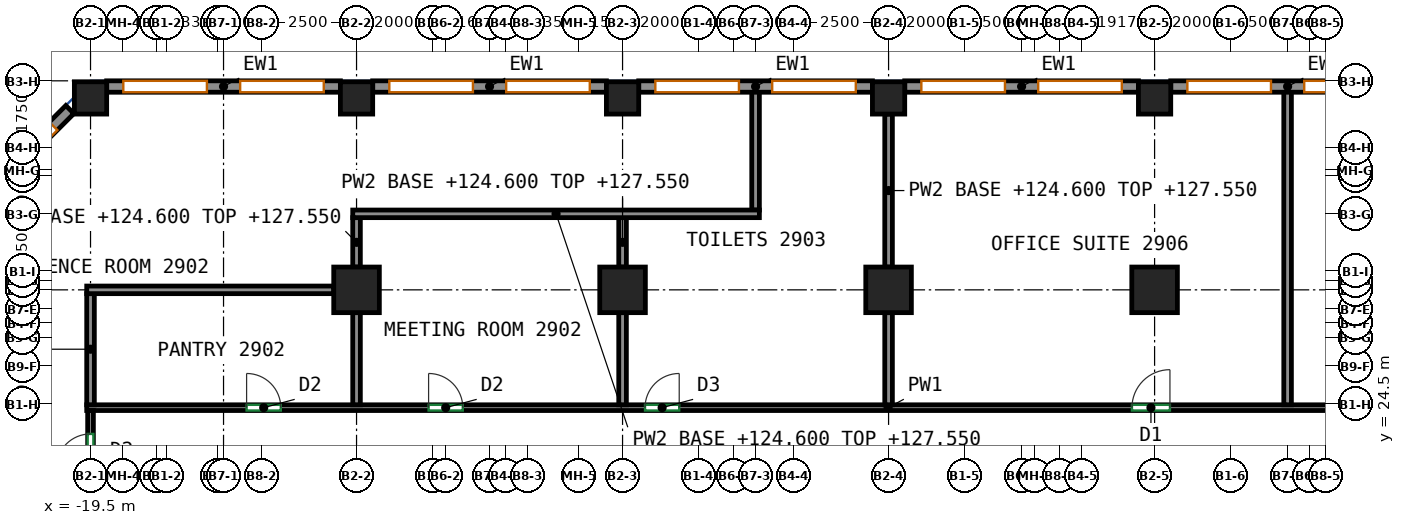
"""IFC4 building model, lengths in metres.
Left out: names, types, materials, properties, quantities, classifications, styles, units other than length and angle.
Written with IfcOpenShell. Run it as: python <this file> out.ifc"""

import sys

from ifc_helpers import new_model, si_unit, direction, frame, frame_2d, origin, origin_2d, place, context, subcontext, project, spatial, rectangle, extrude, source, transform, mapped, element, fill, save


model = new_model("IFC4")
c1 = context("Model", 3, precision=1e-05, world=origin(), true_north=direction((0.0, 1.0)))
c2 = subcontext(c1, "Body", "Model", "MODEL_VIEW")
j1 = project(units=[si_unit("LENGTHUNIT", "METRE"), si_unit("PLANEANGLEUNIT", "RADIAN")], contexts=[c1])
p1 = place(None, origin())
s1 = spatial("IfcSite", under=j1, at=p1, CompositionType="ELEMENT")
p2 = place(p1, origin())
s2 = spatial("IfcBuilding", under=s1, at=p2, CompositionType="ELEMENT")
p3 = place(p2, frame((0.0, 0.0, 124.6)))
s3 = spatial("IfcBuildingStorey", under=s2, at=p3, CompositionType="ELEMENT", Elevation=124.6)
m1 = source(origin(), c2, "Body", "SweptSolid", [
    extrude(rectangle(XDim=0.85, YDim=0.85, at=origin_2d()), origin(), (0.0, 0.0, 1.0), 3.6),
])
p4 = place(p3, frame((-19.5, 32.55, 0.0), z_axis=(0.0, 0.0, 1.0), x_axis=(1.0, 0.0, 0.0)))
e1 = element("IfcColumn", 1, at=p4, inside=s3, PredefinedType="COLUMN", context=c2, shape_type="MappedRepresentation", body=[
    mapped(m1, transform((0.0, 0.0, 0.0))),
])
m2 = source(origin(), c2, "Body", "SweptSolid", [
    extrude(rectangle(XDim=1.2, YDim=1.2, at=origin_2d()), origin(), (0.0, 0.0, 1.0), 3.6),
])
p5 = place(p3, frame((-12.5, 27.5, 0.0), z_axis=(0.0, 0.0, 1.0), x_axis=(1.0, 0.0, 0.0)))
e2 = element("IfcColumn", 2, at=p5, inside=s3, PredefinedType="COLUMN", context=c2, shape_type="MappedRepresentation", body=[
    mapped(m2, transform((0.0, 0.0, 0.0))),
])
p6 = place(p3, frame((-12.5, 32.55, 0.0), z_axis=(0.0, 0.0, 1.0), x_axis=(1.0, 0.0, 0.0)))
e3 = element("IfcColumn", 3, at=p6, inside=s3, PredefinedType="COLUMN", context=c2, shape_type="MappedRepresentation", body=[
    mapped(m1, transform((0.0, 0.0, 0.0))),
])
p7 = place(p3, frame((-5.5, 27.5, 0.0), z_axis=(0.0, 0.0, 1.0), x_axis=(1.0, 0.0, 0.0)))
e4 = element("IfcColumn", 4, at=p7, inside=s3, PredefinedType="COLUMN", context=c2, shape_type="MappedRepresentation", body=[
    mapped(m2, transform((0.0, 0.0, 0.0))),
])
p8 = place(p3, frame((-5.5, 32.55, 0.0), z_axis=(0.0, 0.0, 1.0), x_axis=(1.0, 0.0, 0.0)))
e5 = element("IfcColumn", 5, at=p8, inside=s3, PredefinedType="COLUMN", context=c2, shape_type="MappedRepresentation", body=[
    mapped(m1, transform((0.0, 0.0, 0.0))),
])
p9 = place(p3, frame((1.5, 27.5, 0.0), z_axis=(0.0, 0.0, 1.0), x_axis=(1.0, 0.0, 0.0)))
e6 = element("IfcColumn", 6, at=p9, inside=s3, PredefinedType="COLUMN", context=c2, shape_type="MappedRepresentation", body=[
    mapped(m2, transform((0.0, 0.0, 0.0))),
])
p10 = place(p3, frame((1.5, 32.55, 0.0), z_axis=(0.0, 0.0, 1.0), x_axis=(1.0, 0.0, 0.0)))
e7 = element("IfcColumn", 7, at=p10, inside=s3, PredefinedType="COLUMN", context=c2, shape_type="MappedRepresentation", body=[
    mapped(m1, transform((0.0, 0.0, 0.0))),
])
p11 = place(p3, frame((8.5, 27.5, 0.0), z_axis=(0.0, 0.0, 1.0), x_axis=(1.0, 0.0, 0.0)))
e8 = element("IfcColumn", 8, at=p11, inside=s3, PredefinedType="COLUMN", context=c2, shape_type="MappedRepresentation", body=[
    mapped(m2, transform((0.0, 0.0, 0.0))),
])
p12 = place(p3, frame((8.5, 32.55, 0.0), z_axis=(0.0, 0.0, 1.0), x_axis=(1.0, 0.0, 0.0)))
e9 = element("IfcColumn", 9, at=p12, inside=s3, PredefinedType="COLUMN", context=c2, shape_type="MappedRepresentation", body=[
    mapped(m1, transform((0.0, 0.0, 0.0))),
])
m3 = source(origin(), c2, "Body", "SweptSolid", [
    extrude(rectangle(XDim=6.15, YDim=0.3, at=frame_2d((3.075, 0.0))), origin(), (0.0, 0.0, 1.0), 3.6),
])
p13 = place(p3, frame((15.075, 32.85, 0.0), z_axis=(0.0, 0.0, 1.0), x_axis=(-1.0, 0.0, 0.0)))
e10 = element("IfcWall", 10, at=p13, inside=s3, PredefinedType="SOLIDWALL", context=c2, shape_type="MappedRepresentation", body=[
    mapped(m3, transform((0.0, 0.0, 0.0))),
])
p14 = place(p13, frame((0.438, 0.0, 0.7)))
e11 = element("IfcOpeningElement", 11, at=p14, cuts=e10, PredefinedType="OPENING", context=c2, shape_type="SweptSolid", body=[
    extrude(rectangle(XDim=2.2, YDim=2.25, at=frame_2d((1.1, 1.125))), frame((0.0, 0.16, 0.0), z_axis=(0.0, -1.0, 0.0), x_axis=(1.0, 0.0, 0.0)), (0.0, 0.0, 1.0), 0.32),
])
p15 = place(p13, frame((3.512, 0.0, 0.7)))
e12 = element("IfcOpeningElement", 12, at=p15, cuts=e10, PredefinedType="OPENING", context=c2, shape_type="SweptSolid", body=[
    extrude(rectangle(XDim=2.2, YDim=2.25, at=frame_2d((1.1, 1.125))), frame((0.0, 0.16, 0.0), z_axis=(0.0, -1.0, 0.0), x_axis=(1.0, 0.0, 0.0)), (0.0, 0.0, 1.0), 0.32),
])
p16 = place(p3, frame((8.075, 32.85, 0.0), z_axis=(0.0, 0.0, 1.0), x_axis=(-1.0, 0.0, 0.0)))
e13 = element("IfcWall", 13, at=p16, inside=s3, PredefinedType="SOLIDWALL", context=c2, shape_type="MappedRepresentation", body=[
    mapped(m3, transform((0.0, 0.0, 0.0))),
])
p17 = place(p16, frame((0.438, 0.0, 0.7)))
e14 = element("IfcOpeningElement", 14, at=p17, cuts=e13, PredefinedType="OPENING", context=c2, shape_type="SweptSolid", body=[
    extrude(rectangle(XDim=2.2, YDim=2.25, at=frame_2d((1.1, 1.125))), frame((0.0, 0.16, 0.0), z_axis=(0.0, -1.0, 0.0), x_axis=(1.0, 0.0, 0.0)), (0.0, 0.0, 1.0), 0.32),
])
p18 = place(p16, frame((3.512, 0.0, 0.7)))
e15 = element("IfcOpeningElement", 15, at=p18, cuts=e13, PredefinedType="OPENING", context=c2, shape_type="SweptSolid", body=[
    extrude(rectangle(XDim=2.2, YDim=2.25, at=frame_2d((1.1, 1.125))), frame((0.0, 0.16, 0.0), z_axis=(0.0, -1.0, 0.0), x_axis=(1.0, 0.0, 0.0)), (0.0, 0.0, 1.0), 0.32),
])
p19 = place(p3, frame((1.075, 32.85, 0.0), z_axis=(0.0, 0.0, 1.0), x_axis=(-1.0, 0.0, 0.0)))
e16 = element("IfcWall", 16, at=p19, inside=s3, PredefinedType="SOLIDWALL", context=c2, shape_type="MappedRepresentation", body=[
    mapped(m3, transform((0.0, 0.0, 0.0))),
])
p20 = place(p19, frame((0.438, 0.0, 0.7)))
e17 = element("IfcOpeningElement", 17, at=p20, cuts=e16, PredefinedType="OPENING", context=c2, shape_type="SweptSolid", body=[
    extrude(rectangle(XDim=2.2, YDim=2.25, at=frame_2d((1.1, 1.125))), frame((0.0, 0.16, 0.0), z_axis=(0.0, -1.0, 0.0), x_axis=(1.0, 0.0, 0.0)), (0.0, 0.0, 1.0), 0.32),
])
p21 = place(p19, frame((3.512, 0.0, 0.7)))
e18 = element("IfcOpeningElement", 18, at=p21, cuts=e16, PredefinedType="OPENING", context=c2, shape_type="SweptSolid", body=[
    extrude(rectangle(XDim=2.2, YDim=2.25, at=frame_2d((1.1, 1.125))), frame((0.0, 0.16, 0.0), z_axis=(0.0, -1.0, 0.0), x_axis=(1.0, 0.0, 0.0)), (0.0, 0.0, 1.0), 0.32),
])
p22 = place(p3, frame((-5.925, 32.85, 0.0), z_axis=(0.0, 0.0, 1.0), x_axis=(-1.0, 0.0, 0.0)))
e19 = element("IfcWall", 19, at=p22, inside=s3, PredefinedType="SOLIDWALL", context=c2, shape_type="MappedRepresentation", body=[
    mapped(m3, transform((0.0, 0.0, 0.0))),
])
p23 = place(p22, frame((0.438, 0.0, 0.7)))
e20 = element("IfcOpeningElement", 20, at=p23, cuts=e19, PredefinedType="OPENING", context=c2, shape_type="SweptSolid", body=[
    extrude(rectangle(XDim=2.2, YDim=2.25, at=frame_2d((1.1, 1.125))), frame((0.0, 0.16, 0.0), z_axis=(0.0, -1.0, 0.0), x_axis=(1.0, 0.0, 0.0)), (0.0, 0.0, 1.0), 0.32),
])
p24 = place(p22, frame((3.512, 0.0, 0.7)))
e21 = element("IfcOpeningElement", 21, at=p24, cuts=e19, PredefinedType="OPENING", context=c2, shape_type="SweptSolid", body=[
    extrude(rectangle(XDim=2.2, YDim=2.25, at=frame_2d((1.1, 1.125))), frame((0.0, 0.16, 0.0), z_axis=(0.0, -1.0, 0.0), x_axis=(1.0, 0.0, 0.0)), (0.0, 0.0, 1.0), 0.32),
])
p25 = place(p3, frame((-12.925, 32.85, 0.0), z_axis=(0.0, 0.0, 1.0), x_axis=(-1.0, 0.0, 0.0)))
e22 = element("IfcWall", 22, at=p25, inside=s3, PredefinedType="SOLIDWALL", context=c2, shape_type="MappedRepresentation", body=[
    mapped(m3, transform((0.0, 0.0, 0.0))),
])
p26 = place(p25, frame((0.438, 0.0, 0.7)))
e23 = element("IfcOpeningElement", 23, at=p26, cuts=e22, PredefinedType="OPENING", context=c2, shape_type="SweptSolid", body=[
    extrude(rectangle(XDim=2.2, YDim=2.25, at=frame_2d((1.1, 1.125))), frame((0.0, 0.16, 0.0), z_axis=(0.0, -1.0, 0.0), x_axis=(1.0, 0.0, 0.0)), (0.0, 0.0, 1.0), 0.32),
])
p27 = place(p25, frame((3.512, 0.0, 0.7)))
e24 = element("IfcOpeningElement", 24, at=p27, cuts=e22, PredefinedType="OPENING", context=c2, shape_type="SweptSolid", body=[
    extrude(rectangle(XDim=2.2, YDim=2.25, at=frame_2d((1.1, 1.125))), frame((0.0, 0.16, 0.0), z_axis=(0.0, -1.0, 0.0), x_axis=(1.0, 0.0, 0.0)), (0.0, 0.0, 1.0), 0.32),
])
m4 = source(origin(), c2, "Body", "SweptSolid", [
    extrude(rectangle(XDim=3.429, YDim=0.3, at=frame_2d((1.715, 0.0))), origin(), (0.0, 0.0, 1.0), 3.6),
])
p28 = place(p3, frame((-20.044, 32.244, 0.0), z_axis=(0.0, 0.0, 1.0), x_axis=(-0.707106781187, -0.707106781187, 0.0)))
e25 = element("IfcWall", 25, at=p28, inside=s3, PredefinedType="SOLIDWALL", context=c2, shape_type="MappedRepresentation", body=[
    mapped(m4, transform((0.0, 0.0, 0.0))),
])
p29 = place(p28, frame((0.615, 0.0, 0.7)))
e26 = element("IfcOpeningElement", 26, at=p29, cuts=e25, PredefinedType="OPENING", context=c2, shape_type="SweptSolid", body=[
    extrude(rectangle(XDim=2.2, YDim=2.25, at=frame_2d((1.1, 1.125))), frame((0.0, 0.16, 0.0), z_axis=(0.0, -1.0, 0.0), x_axis=(1.0, 0.0, 0.0)), (0.0, 0.0, 1.0), 0.32),
])
p30 = place(p3, frame((-19.6, 24.4, 0.0), z_axis=(0.0, 0.0, 1.0), x_axis=(1.0, 0.0, 0.0)))
e27 = element("IfcWall", 27, at=p30, inside=s3, PredefinedType="PARTITIONING", context=c2, shape_type="SweptSolid", body=[
    extrude(rectangle(XDim=42.175, YDim=0.15, at=frame_2d((21.087, 0.0))), origin(), (0.0, 0.0, 1.0), 3.6),
])
p31 = place(p30, frame((4.207, 0.0, 0.0)))
e28 = element("IfcOpeningElement", 28, at=p31, cuts=e27, PredefinedType="OPENING", context=c2, shape_type="SweptSolid", body=[
    extrude(rectangle(XDim=0.9, YDim=2.1, at=frame_2d((0.45, 1.05))), frame((0.0, 0.085, 0.0), z_axis=(0.0, -1.0, 0.0), x_axis=(1.0, 0.0, 0.0)), (0.0, 0.0, 1.0), 0.17),
])
p32 = place(p30, frame((8.996, 0.0, 0.0)))
e29 = element("IfcOpeningElement", 29, at=p32, cuts=e27, PredefinedType="OPENING", context=c2, shape_type="SweptSolid", body=[
    extrude(rectangle(XDim=0.9, YDim=2.1, at=frame_2d((0.45, 1.05))), frame((0.0, 0.085, 0.0), z_axis=(0.0, -1.0, 0.0), x_axis=(1.0, 0.0, 0.0)), (0.0, 0.0, 1.0), 0.17),
])
p33 = place(p30, frame((14.691, 0.0, 0.0)))
e30 = element("IfcOpeningElement", 30, at=p33, cuts=e27, PredefinedType="OPENING", context=c2, shape_type="SweptSolid", body=[
    extrude(rectangle(XDim=0.9, YDim=2.1, at=frame_2d((0.45, 1.05))), frame((0.0, 0.085, 0.0), z_axis=(0.0, -1.0, 0.0), x_axis=(1.0, 0.0, 0.0)), (0.0, 0.0, 1.0), 0.17),
])
p34 = place(p30, frame((27.504, 0.0, 0.0)))
e31 = element("IfcOpeningElement", 31, at=p34, cuts=e27, PredefinedType="OPENING", context=c2, shape_type="SweptSolid", body=[
    extrude(rectangle(XDim=1.0, YDim=2.1, at=frame_2d((0.5, 1.05))), frame((0.0, 0.085, 0.0), z_axis=(0.0, -1.0, 0.0), x_axis=(1.0, 0.0, 0.0)), (0.0, 0.0, 1.0), 0.17),
])
p35 = place(p30, frame((33.709, 0.0, 0.0)))
e32 = element("IfcOpeningElement", 32, at=p35, cuts=e27, PredefinedType="OPENING", context=c2, shape_type="SweptSolid", body=[
    extrude(rectangle(XDim=1.8, YDim=2.1, at=frame_2d((0.9, 1.05))), frame((0.0, 0.085, 0.0), z_axis=(0.0, -1.0, 0.0), x_axis=(1.0, 0.0, 0.0)), (0.0, 0.0, 1.0), 0.17),
])
p36 = place(p3, frame((-19.5, 22.09, 0.0), z_axis=(0.0, 0.0, 1.0), x_axis=(0.0, 1.0, 0.0)))
e33 = element("IfcWall", 33, at=p36, inside=s3, PredefinedType="PARTITIONING", context=c2, shape_type="SweptSolid", body=[
    extrude(rectangle(XDim=2.235, YDim=0.15, at=frame_2d((1.117, 0.0))), origin(), (0.0, 0.0, 1.0), 2.95),
])
p37 = place(p36, frame((0.719, 0.0, 0.0)))
e34 = element("IfcOpeningElement", 34, at=p37, cuts=e33, PredefinedType="OPENING", context=c2, shape_type="SweptSolid", body=[
    extrude(rectangle(XDim=0.9, YDim=2.1, at=frame_2d((0.45, 1.05))), frame((0.0, 0.085, 0.0), z_axis=(0.0, -1.0, 0.0), x_axis=(1.0, 0.0, 0.0)), (0.0, 0.0, 1.0), 0.17),
])
p38 = place(p3, frame((12.0, 24.476, 0.0), z_axis=(0.0, 0.0, 1.0), x_axis=(0.0, 1.0, 0.0)))
e35 = element("IfcWall", 35, at=p38, inside=s3, PredefinedType="PARTITIONING", context=c2, shape_type="SweptSolid", body=[
    extrude(rectangle(XDim=8.274, YDim=0.2, at=frame_2d((4.137, 0.0))), origin(), (0.0, 0.0, 1.0), 3.6),
])
p39 = place(p3, frame((1.5, 24.476, 0.0), z_axis=(0.0, 0.0, 1.0), x_axis=(0.0, 1.0, 0.0)))
e36 = element("IfcWall", 36, at=p39, inside=s3, PredefinedType="PARTITIONING", context=c2, shape_type="SweptSolid", body=[
    extrude(rectangle(XDim=2.424, YDim=0.2, at=frame_2d((1.212, 0.0))), origin(), (0.0, 0.0, 1.0), 3.6),
])
p40 = place(p3, frame((1.5, 28.1, 0.0), z_axis=(0.0, 0.0, 1.0), x_axis=(0.0, 1.0, 0.0)))
e37 = element("IfcWall", 37, at=p40, inside=s3, PredefinedType="PARTITIONING", context=c2, shape_type="SweptSolid", body=[
    extrude(rectangle(XDim=4.025, YDim=0.2, at=frame_2d((2.012, 0.0))), origin(), (0.0, 0.0, 1.0), 2.95),
])
p41 = place(p3, frame((-5.5, 28.1, 0.0), z_axis=(0.0, 0.0, 1.0), x_axis=(0.0, 1.0, 0.0)))
e38 = element("IfcWall", 38, at=p41, inside=s3, PredefinedType="PARTITIONING", context=c2, shape_type="SweptSolid", body=[
    extrude(rectangle(XDim=1.3, YDim=0.2, at=frame_2d((0.65, 0.0))), origin(), (0.0, 0.0, 1.0), 2.95),
])
p42 = place(p3, frame((-5.5, 24.476, 0.0), z_axis=(0.0, 0.0, 1.0), x_axis=(0.0, 1.0, 0.0)))
e39 = element("IfcWall", 39, at=p42, inside=s3, PredefinedType="PARTITIONING", context=c2, shape_type="SweptSolid", body=[
    extrude(rectangle(XDim=2.424, YDim=0.2, at=frame_2d((1.212, 0.0))), origin(), (0.0, 0.0, 1.0), 3.6),
])
p43 = place(p3, frame((-2.0, 29.6, 0.0), z_axis=(0.0, 0.0, 1.0), x_axis=(0.0, 1.0, 0.0)))
e40 = element("IfcWall", 40, at=p43, inside=s3, PredefinedType="PARTITIONING", context=c2, shape_type="SweptSolid", body=[
    extrude(rectangle(XDim=3.15, YDim=0.2, at=frame_2d((1.575, 0.0))), origin(), (0.0, 0.0, 1.0), 3.6),
])
p44 = place(p3, frame((-12.5, 24.476, 0.0), z_axis=(0.0, 0.0, 1.0), x_axis=(0.0, 1.0, 0.0)))
e41 = element("IfcWall", 41, at=p44, inside=s3, PredefinedType="PARTITIONING", context=c2, shape_type="SweptSolid", body=[
    extrude(rectangle(XDim=2.424, YDim=0.2, at=frame_2d((1.212, 0.0))), origin(), (0.0, 0.0, 1.0), 3.6),
])
p45 = place(p3, frame((-12.5, 28.1, 0.0), z_axis=(0.0, 0.0, 1.0), x_axis=(0.0, 1.0, 0.0)))
e42 = element("IfcWall", 42, at=p45, inside=s3, PredefinedType="PARTITIONING", context=c2, shape_type="SweptSolid", body=[
    extrude(rectangle(XDim=1.3, YDim=0.2, at=frame_2d((0.65, 0.0))), origin(), (0.0, 0.0, 1.0), 2.95),
])
p46 = place(p3, frame((-12.6, 29.5, 0.0), z_axis=(0.0, 0.0, 1.0), x_axis=(1.0, 0.0, 0.0)))
e43 = element("IfcWall", 43, at=p46, inside=s3, PredefinedType="PARTITIONING", context=c2, shape_type="SweptSolid", body=[
    extrude(rectangle(XDim=10.7, YDim=0.2, at=frame_2d((5.35, 0.0))), origin(), (0.0, 0.0, 1.0), 2.95),
])
p47 = place(p3, frame((-19.5, 27.4, 0.0), z_axis=(0.0, 0.0, 1.0), x_axis=(0.0, -1.0, 0.0)))
e44 = element("IfcWall", 44, at=p47, inside=s3, PredefinedType="PARTITIONING", context=c2, shape_type="SweptSolid", body=[
    extrude(rectangle(XDim=2.924, YDim=0.2, at=frame_2d((1.462, 0.0))), origin(), (0.0, 0.0, 1.0), 2.95),
])
p48 = place(p3, frame((-13.1, 27.5, 0.0), z_axis=(0.0, 0.0, 1.0), x_axis=(-1.0, 0.0, 0.0)))
e45 = element("IfcWall", 45, at=p48, inside=s3, PredefinedType="PARTITIONING", context=c2, shape_type="SweptSolid", body=[
    extrude(rectangle(XDim=6.5, YDim=0.2, at=frame_2d((3.25, 0.0))), origin(), (0.0, 0.0, 1.0), 3.6),
])
p49 = place(p14, origin())
e46 = element("IfcWindow", 46, at=p49, inside=s3, PartitioningType="SINGLE_PANEL", PredefinedType="WINDOW", context=c2, shape_type="SweptSolid", body=[
    extrude(rectangle(XDim=2.2, YDim=2.25, at=frame_2d((1.1, 1.125))), frame((0.0, 0.03, 0.0), z_axis=(0.0, -1.0, 0.0), x_axis=(1.0, 0.0, 0.0)), (0.0, 0.0, 1.0), 0.06),
])
fill(e11, e46)
p50 = place(p15, origin())
e47 = element("IfcWindow", 47, at=p50, inside=s3, PartitioningType="SINGLE_PANEL", PredefinedType="WINDOW", context=c2, shape_type="SweptSolid", body=[
    extrude(rectangle(XDim=2.2, YDim=2.25, at=frame_2d((1.1, 1.125))), frame((0.0, 0.03, 0.0), z_axis=(0.0, -1.0, 0.0), x_axis=(1.0, 0.0, 0.0)), (0.0, 0.0, 1.0), 0.06),
])
fill(e12, e47)
p51 = place(p17, origin())
e48 = element("IfcWindow", 48, at=p51, inside=s3, PartitioningType="SINGLE_PANEL", PredefinedType="WINDOW", context=c2, shape_type="SweptSolid", body=[
    extrude(rectangle(XDim=2.2, YDim=2.25, at=frame_2d((1.1, 1.125))), frame((0.0, 0.03, 0.0), z_axis=(0.0, -1.0, 0.0), x_axis=(1.0, 0.0, 0.0)), (0.0, 0.0, 1.0), 0.06),
])
fill(e14, e48)
p52 = place(p18, origin())
e49 = element("IfcWindow", 49, at=p52, inside=s3, PartitioningType="SINGLE_PANEL", PredefinedType="WINDOW", context=c2, shape_type="SweptSolid", body=[
    extrude(rectangle(XDim=2.2, YDim=2.25, at=frame_2d((1.1, 1.125))), frame((0.0, 0.03, 0.0), z_axis=(0.0, -1.0, 0.0), x_axis=(1.0, 0.0, 0.0)), (0.0, 0.0, 1.0), 0.06),
])
fill(e15, e49)
p53 = place(p20, origin())
e50 = element("IfcWindow", 50, at=p53, inside=s3, PartitioningType="SINGLE_PANEL", PredefinedType="WINDOW", context=c2, shape_type="SweptSolid", body=[
    extrude(rectangle(XDim=2.2, YDim=2.25, at=frame_2d((1.1, 1.125))), frame((0.0, 0.03, 0.0), z_axis=(0.0, -1.0, 0.0), x_axis=(1.0, 0.0, 0.0)), (0.0, 0.0, 1.0), 0.06),
])
fill(e17, e50)
p54 = place(p21, origin())
e51 = element("IfcWindow", 51, at=p54, inside=s3, PartitioningType="SINGLE_PANEL", PredefinedType="WINDOW", context=c2, shape_type="SweptSolid", body=[
    extrude(rectangle(XDim=2.2, YDim=2.25, at=frame_2d((1.1, 1.125))), frame((0.0, 0.03, 0.0), z_axis=(0.0, -1.0, 0.0), x_axis=(1.0, 0.0, 0.0)), (0.0, 0.0, 1.0), 0.06),
])
fill(e18, e51)
p55 = place(p23, origin())
e52 = element("IfcWindow", 52, at=p55, inside=s3, PartitioningType="SINGLE_PANEL", PredefinedType="WINDOW", context=c2, shape_type="SweptSolid", body=[
    extrude(rectangle(XDim=2.2, YDim=2.25, at=frame_2d((1.1, 1.125))), frame((0.0, 0.03, 0.0), z_axis=(0.0, -1.0, 0.0), x_axis=(1.0, 0.0, 0.0)), (0.0, 0.0, 1.0), 0.06),
])
fill(e20, e52)
p56 = place(p24, origin())
e53 = element("IfcWindow", 53, at=p56, inside=s3, PartitioningType="SINGLE_PANEL", PredefinedType="WINDOW", context=c2, shape_type="SweptSolid", body=[
    extrude(rectangle(XDim=2.2, YDim=2.25, at=frame_2d((1.1, 1.125))), frame((0.0, 0.03, 0.0), z_axis=(0.0, -1.0, 0.0), x_axis=(1.0, 0.0, 0.0)), (0.0, 0.0, 1.0), 0.06),
])
fill(e21, e53)
p57 = place(p26, origin())
e54 = element("IfcWindow", 54, at=p57, inside=s3, PartitioningType="SINGLE_PANEL", PredefinedType="WINDOW", context=c2, shape_type="SweptSolid", body=[
    extrude(rectangle(XDim=2.2, YDim=2.25, at=frame_2d((1.1, 1.125))), frame((0.0, 0.03, 0.0), z_axis=(0.0, -1.0, 0.0), x_axis=(1.0, 0.0, 0.0)), (0.0, 0.0, 1.0), 0.06),
])
fill(e23, e54)
p58 = place(p27, origin())
e55 = element("IfcWindow", 55, at=p58, inside=s3, PartitioningType="SINGLE_PANEL", PredefinedType="WINDOW", context=c2, shape_type="SweptSolid", body=[
    extrude(rectangle(XDim=2.2, YDim=2.25, at=frame_2d((1.1, 1.125))), frame((0.0, 0.03, 0.0), z_axis=(0.0, -1.0, 0.0), x_axis=(1.0, 0.0, 0.0)), (0.0, 0.0, 1.0), 0.06),
])
fill(e24, e55)
p59 = place(p29, origin())
e56 = element("IfcWindow", 56, at=p59, inside=s3, PartitioningType="SINGLE_PANEL", PredefinedType="WINDOW", context=c2, shape_type="SweptSolid", body=[
    extrude(rectangle(XDim=2.2, YDim=2.25, at=frame_2d((1.1, 1.125))), frame((0.0, 0.03, 0.0), z_axis=(0.0, -1.0, 0.0), x_axis=(1.0, 0.0, 0.0)), (0.0, 0.0, 1.0), 0.06),
])
fill(e26, e56)
p60 = place(p37, origin())
e57 = element("IfcDoor", 57, at=p60, inside=s3, OperationType="SINGLE_SWING_LEFT", PredefinedType="DOOR", context=c2, shape_type="SweptSolid", body=[
    extrude(rectangle(XDim=0.9, YDim=2.1, at=frame_2d((0.45, 1.05))), frame((0.0, 0.025, 0.0), z_axis=(0.0, -1.0, 0.0), x_axis=(1.0, 0.0, 0.0)), (0.0, 0.0, 1.0), 0.05),
])
fill(e34, e57)
p61 = place(p31, origin())
e58 = element("IfcDoor", 58, at=p61, inside=s3, OperationType="SINGLE_SWING_LEFT", PredefinedType="DOOR", context=c2, shape_type="SweptSolid", body=[
    extrude(rectangle(XDim=0.9, YDim=2.1, at=frame_2d((0.45, 1.05))), frame((0.0, 0.025, 0.0), z_axis=(0.0, -1.0, 0.0), x_axis=(1.0, 0.0, 0.0)), (0.0, 0.0, 1.0), 0.05),
])
fill(e28, e58)
p62 = place(p32, origin())
e59 = element("IfcDoor", 59, at=p62, inside=s3, OperationType="SINGLE_SWING_LEFT", PredefinedType="DOOR", context=c2, shape_type="SweptSolid", body=[
    extrude(rectangle(XDim=0.9, YDim=2.1, at=frame_2d((0.45, 1.05))), frame((0.0, 0.025, 0.0), z_axis=(0.0, -1.0, 0.0), x_axis=(1.0, 0.0, 0.0)), (0.0, 0.0, 1.0), 0.05),
])
fill(e29, e59)
p63 = place(p33, origin())
e60 = element("IfcDoor", 60, at=p63, inside=s3, OperationType="SINGLE_SWING_RIGHT", PredefinedType="DOOR", context=c2, shape_type="SweptSolid", body=[
    extrude(rectangle(XDim=0.9, YDim=2.1, at=frame_2d((0.45, 1.05))), frame((0.0, 0.025, 0.0), z_axis=(0.0, -1.0, 0.0), x_axis=(1.0, 0.0, 0.0)), (0.0, 0.0, 1.0), 0.05),
])
fill(e30, e60)
p64 = place(p34, origin())
e61 = element("IfcDoor", 61, at=p64, inside=s3, OperationType="SINGLE_SWING_RIGHT", PredefinedType="DOOR", context=c2, shape_type="SweptSolid", body=[
    extrude(rectangle(XDim=1.0, YDim=2.1, at=frame_2d((0.5, 1.05))), frame((0.0, 0.025, 0.0), z_axis=(0.0, -1.0, 0.0), x_axis=(1.0, 0.0, 0.0)), (0.0, 0.0, 1.0), 0.05),
])
fill(e31, e61)
save(model, sys.argv[1])
